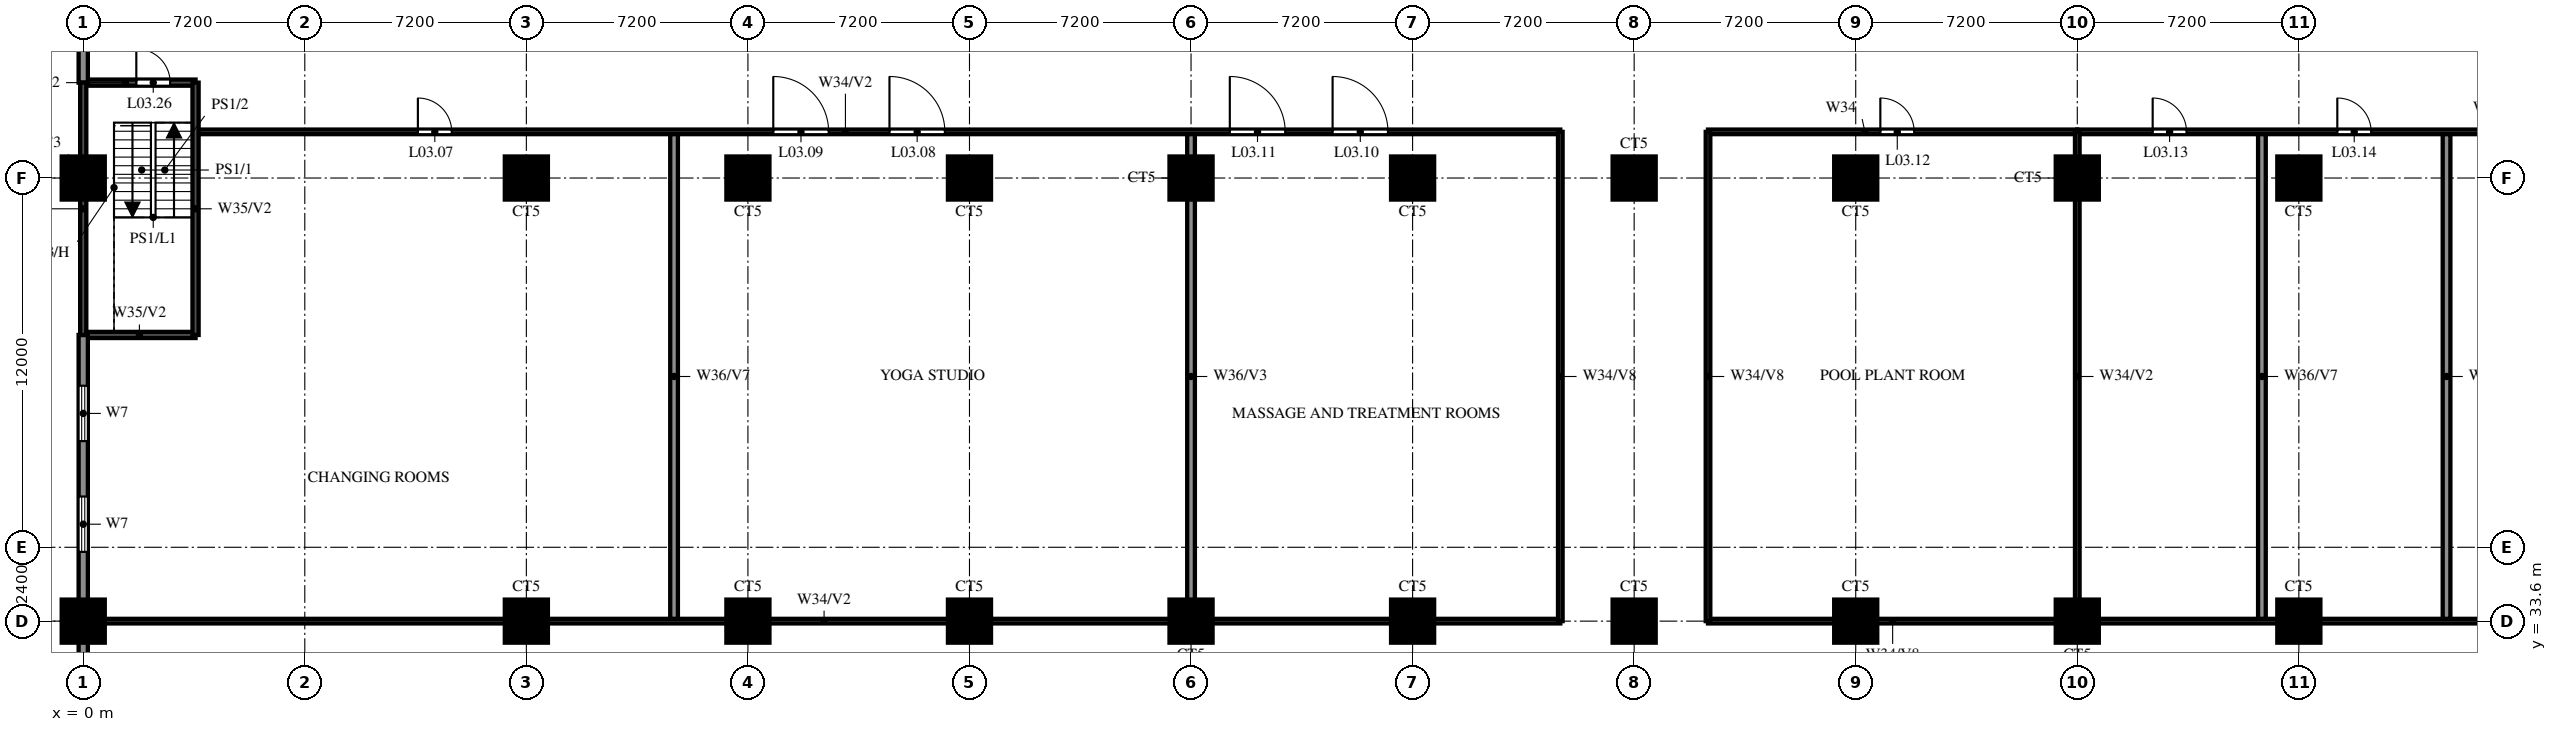
"""IFC4 building model, lengths in metres.
Left out: names, types, materials, properties, quantities, classifications, styles, units other than length and angle.
Written with IfcOpenShell. Run it as: python <this file> out.ifc"""

import sys

from ifc_helpers import new_model, si_unit, direction, frame, frame_2d, origin, origin_2d, place, context, subcontext, project, spatial, rectangle, circle, extrude, source, transform, mapped, element, fill, save


model = new_model("IFC4")
c1 = context("Model", 3, precision=1e-05, world=origin(), true_north=direction((0.0, 1.0)))
c2 = subcontext(c1, "Body", "Model", "MODEL_VIEW")
j1 = project(units=[si_unit("LENGTHUNIT", "METRE"), si_unit("PLANEANGLEUNIT", "RADIAN")], contexts=[c1])
p1 = place(None, origin())
s1 = spatial("IfcSite", under=j1, at=p1, CompositionType="ELEMENT")
p2 = place(p1, origin())
s2 = spatial("IfcBuilding", under=s1, at=p2, CompositionType="ELEMENT")
p3 = place(p2, frame((0.0, 0.0, 17.4)))
s3 = spatial("IfcBuildingStorey", under=s2, at=p3, CompositionType="ELEMENT", Elevation=17.4)
m1 = source(origin(), c2, "Body", "SweptSolid", [
    extrude(circle(Radius=0.7, at=origin_2d()), origin(), (0.0, 0.0, 1.0), 3.8),
])
for number, where, z_axis, x_axis in (
    (1, (0.0, 33.6, 0.0), (0.0, 0.0, 1.0), (1.0, 0.0, 0.0)),
    (2, (14.4, 33.6, 0.0), (0.0, 0.0, 1.0), (1.0, 0.0, 0.0)),
    (3, (21.6, 33.6, 0.0), (0.0, 0.0, 1.0), (1.0, 0.0, 0.0)),
    (4, (28.8, 33.6, 0.0), (0.0, 0.0, 1.0), (1.0, 0.0, 0.0)),
    (5, (36.0, 33.6, 0.0), (0.0, 0.0, 1.0), (1.0, 0.0, 0.0)),
    (6, (43.2, 33.6, 0.0), (0.0, 0.0, 1.0), (1.0, 0.0, 0.0)),
    (7, (50.4, 33.6, 0.0), (0.0, 0.0, 1.0), (1.0, 0.0, 0.0)),
    (8, (57.6, 33.6, 0.0), (0.0, 0.0, 1.0), (1.0, 0.0, 0.0)),
    (9, (64.8, 33.6, 0.0), (0.0, 0.0, 1.0), (1.0, 0.0, 0.0)),
    (10, (72.0, 33.6, 0.0), (0.0, 0.0, 1.0), (1.0, 0.0, 0.0)),
    (11, (0.0, 48.0, 0.0), (0.0, 0.0, 1.0), (1.0, 0.0, 0.0)),
    (12, (14.4, 48.0, 0.0), (0.0, 0.0, 1.0), (1.0, 0.0, 0.0)),
    (13, (21.6, 48.0, 0.0), (0.0, 0.0, 1.0), (1.0, 0.0, 0.0)),
    (14, (28.8, 48.0, 0.0), (0.0, 0.0, 1.0), (1.0, 0.0, 0.0)),
    (15, (36.0, 48.0, 0.0), (0.0, 0.0, 1.0), (1.0, 0.0, 0.0)),
    (16, (43.2, 48.0, 0.0), (0.0, 0.0, 1.0), (1.0, 0.0, 0.0)),
    (17, (50.4, 48.0, 0.0), (0.0, 0.0, 1.0), (1.0, 0.0, 0.0)),
    (18, (57.6, 48.0, 0.0), (0.0, 0.0, 1.0), (1.0, 0.0, 0.0)),
    (19, (64.8, 48.0, 0.0), (0.0, 0.0, 1.0), (1.0, 0.0, 0.0)),
    (20, (72.0, 48.0, 0.0), (0.0, 0.0, 1.0), (1.0, 0.0, 0.0)),
):
    element("IfcColumn", number, at=place(p3, frame(where, z_axis=z_axis, x_axis=x_axis)), inside=s3, PredefinedType="COLUMN", context=c2, shape_type="MappedRepresentation", body=[
        mapped(m1, transform((0.0, 0.0, 0.0))),
    ])
p4 = place(p3, frame((0.15, 33.6, 0.0), z_axis=(0.0, 0.0, 1.0), x_axis=(1.0, 0.0, 0.0)))
e21 = element("IfcWall", 21, at=p4, inside=s3, PredefinedType="PARTITIONING", context=c2, shape_type="SweptSolid", body=[
    extrude(rectangle(XDim=47.85, YDim=0.15, at=frame_2d((23.925, 0.0))), origin(), (0.0, 0.0, 1.0), 2.6),
])
p5 = place(p3, frame((64.8, 33.6, 0.0), z_axis=(0.0, 0.0, 1.0), x_axis=(1.0, 0.0, 0.0)))
e22 = element("IfcWall", 22, at=p5, inside=s3, PredefinedType="PARTITIONING", context=c2, shape_type="SweptSolid", body=[
    extrude(rectangle(XDim=35.85, YDim=0.15, at=frame_2d((17.925, 0.0))), origin(), (0.0, 0.0, 1.0), 2.6),
])
p6 = place(p3, frame((52.8, 33.6, 0.0), z_axis=(0.0, 0.0, 1.0), x_axis=(1.0, 0.0, 0.0)))
e23 = element("IfcWall", 23, at=p6, inside=s3, PredefinedType="PARTITIONING", context=c2, shape_type="SweptSolid", body=[
    extrude(rectangle(XDim=12.0, YDim=0.15, at=frame_2d((6.0, 0.0))), origin(), (0.0, 0.0, 1.0), 2.9),
])
p7 = place(p3, frame((0.0, 42.9, 0.0), z_axis=(0.0, 0.0, 1.0), x_axis=(1.0, 0.0, 0.0)))
e24 = element("IfcWall", 24, at=p7, inside=s3, PredefinedType="SOLIDWALL", context=c2, shape_type="SweptSolid", body=[
    extrude(rectangle(XDim=3.65, YDim=0.2, at=frame_2d((1.825, 0.0))), origin(), (0.0, 0.0, 1.0), 3.8),
])
p8 = place(p3, frame((3.75, 49.5, 0.0), z_axis=(0.0, 0.0, 1.0), x_axis=(1.0, 0.0, 0.0)))
e25 = element("IfcWall", 25, at=p8, inside=s3, PredefinedType="PARTITIONING", context=c2, shape_type="SweptSolid", body=[
    extrude(rectangle(XDim=44.25, YDim=0.15, at=frame_2d((22.125, 0.0))), origin(), (0.0, 0.0, 1.0), 2.6),
])
p9 = place(p8, frame((7.125, 0.0, 0.0)))
e26 = element("IfcOpeningElement", 26, at=p9, cuts=e25, PredefinedType="OPENING", context=c2, shape_type="SweptSolid", body=[
    extrude(rectangle(XDim=1.1, YDim=2.1, at=frame_2d((0.55, 1.05))), frame((0.0, 0.085, 0.0), z_axis=(0.0, -1.0, 0.0), x_axis=(1.0, 0.0, 0.0)), (0.0, 0.0, 1.0), 0.17),
])
p10 = place(p8, frame((22.45, 0.0, 0.0)))
e27 = element("IfcOpeningElement", 27, at=p10, cuts=e25, PredefinedType="OPENING", context=c2, shape_type="SweptSolid", body=[
    extrude(rectangle(XDim=1.8, YDim=2.1, at=frame_2d((0.9, 1.05))), frame((0.0, 0.085, 0.0), z_axis=(0.0, -1.0, 0.0), x_axis=(1.0, 0.0, 0.0)), (0.0, 0.0, 1.0), 0.17),
])
p11 = place(p8, frame((18.674, 0.0, 0.0)))
e28 = element("IfcOpeningElement", 28, at=p11, cuts=e25, PredefinedType="OPENING", context=c2, shape_type="SweptSolid", body=[
    extrude(rectangle(XDim=1.8, YDim=2.1, at=frame_2d((0.9, 1.05))), frame((0.0, 0.085, 0.0), z_axis=(0.0, -1.0, 0.0), x_axis=(1.0, 0.0, 0.0)), (0.0, 0.0, 1.0), 0.17),
])
p12 = place(p8, frame((36.85, 0.0, 0.0)))
e29 = element("IfcOpeningElement", 29, at=p12, cuts=e25, PredefinedType="OPENING", context=c2, shape_type="SweptSolid", body=[
    extrude(rectangle(XDim=1.8, YDim=2.1, at=frame_2d((0.9, 1.05))), frame((0.0, 0.085, 0.0), z_axis=(0.0, -1.0, 0.0), x_axis=(1.0, 0.0, 0.0)), (0.0, 0.0, 1.0), 0.17),
])
p13 = place(p8, frame((33.51, 0.0, 0.0)))
e30 = element("IfcOpeningElement", 30, at=p13, cuts=e25, PredefinedType="OPENING", context=c2, shape_type="SweptSolid", body=[
    extrude(rectangle(XDim=1.8, YDim=2.1, at=frame_2d((0.9, 1.05))), frame((0.0, 0.085, 0.0), z_axis=(0.0, -1.0, 0.0), x_axis=(1.0, 0.0, 0.0)), (0.0, 0.0, 1.0), 0.17),
])
p14 = place(p3, frame((64.8, 49.5, 0.0), z_axis=(0.0, 0.0, 1.0), x_axis=(1.0, 0.0, 0.0)))
e31 = element("IfcWall", 31, at=p14, inside=s3, PredefinedType="PARTITIONING", context=c2, shape_type="SweptSolid", body=[
    extrude(rectangle(XDim=32.25, YDim=0.15, at=frame_2d((16.125, 0.0))), origin(), (0.0, 0.0, 1.0), 2.6),
])
p15 = place(p14, frame((2.45, 0.0, 0.0)))
e32 = element("IfcOpeningElement", 32, at=p15, cuts=e31, PredefinedType="OPENING", context=c2, shape_type="SweptSolid", body=[
    extrude(rectangle(XDim=1.1, YDim=2.1, at=frame_2d((0.55, 1.05))), frame((0.0, 0.085, 0.0), z_axis=(0.0, -1.0, 0.0), x_axis=(1.0, 0.0, 0.0)), (0.0, 0.0, 1.0), 0.17),
])
p16 = place(p14, frame((8.45, 0.0, 0.0)))
e33 = element("IfcOpeningElement", 33, at=p16, cuts=e31, PredefinedType="OPENING", context=c2, shape_type="SweptSolid", body=[
    extrude(rectangle(XDim=1.1, YDim=2.1, at=frame_2d((0.55, 1.05))), frame((0.0, 0.085, 0.0), z_axis=(0.0, -1.0, 0.0), x_axis=(1.0, 0.0, 0.0)), (0.0, 0.0, 1.0), 0.17),
])
p17 = place(p14, frame((22.425, 0.0, 0.0)))
e34 = element("IfcOpeningElement", 34, at=p17, cuts=e31, PredefinedType="OPENING", context=c2, shape_type="SweptSolid", body=[
    extrude(rectangle(XDim=1.8, YDim=2.1, at=frame_2d((0.9, 1.05))), frame((0.0, 0.085, 0.0), z_axis=(0.0, -1.0, 0.0), x_axis=(1.0, 0.0, 0.0)), (0.0, 0.0, 1.0), 0.17),
])
p18 = place(p14, frame((15.213, 0.0, 0.0)))
e35 = element("IfcOpeningElement", 35, at=p18, cuts=e31, PredefinedType="OPENING", context=c2, shape_type="SweptSolid", body=[
    extrude(rectangle(XDim=1.8, YDim=2.1, at=frame_2d((0.9, 1.05))), frame((0.0, 0.085, 0.0), z_axis=(0.0, -1.0, 0.0), x_axis=(1.0, 0.0, 0.0)), (0.0, 0.0, 1.0), 0.17),
])
p19 = place(p3, frame((52.8, 49.5, 0.0), z_axis=(0.0, 0.0, 1.0), x_axis=(1.0, 0.0, 0.0)))
e36 = element("IfcWall", 36, at=p19, inside=s3, PredefinedType="PARTITIONING", context=c2, shape_type="SweptSolid", body=[
    extrude(rectangle(XDim=12.0, YDim=0.15, at=frame_2d((6.0, 0.0))), origin(), (0.0, 0.0, 1.0), 3.8),
])
p20 = place(p19, frame((5.6, 0.0, 0.0)))
e37 = element("IfcOpeningElement", 37, at=p20, cuts=e36, PredefinedType="OPENING", context=c2, shape_type="SweptSolid", body=[
    extrude(rectangle(XDim=1.1, YDim=2.1, at=frame_2d((0.55, 1.05))), frame((0.0, 0.085, 0.0), z_axis=(0.0, -1.0, 0.0), x_axis=(1.0, 0.0, 0.0)), (0.0, 0.0, 1.0), 0.17),
])
p21 = place(p3, frame((0.0, 51.1, 0.0), z_axis=(0.0, 0.0, 1.0), x_axis=(1.0, 0.0, 0.0)))
e38 = element("IfcWall", 38, at=p21, inside=s3, PredefinedType="SOLIDWALL", context=c2, shape_type="SweptSolid", body=[
    extrude(rectangle(XDim=3.65, YDim=0.2, at=frame_2d((1.825, 0.0))), origin(), (0.0, 0.0, 1.0), 3.8),
])
p22 = place(p21, frame((1.725, 0.0, 0.0)))
e39 = element("IfcOpeningElement", 39, at=p22, cuts=e38, PredefinedType="OPENING", context=c2, shape_type="SweptSolid", body=[
    extrude(rectangle(XDim=1.1, YDim=2.1, at=frame_2d((0.55, 1.05))), frame((0.0, 0.11, 0.0), z_axis=(0.0, -1.0, 0.0), x_axis=(1.0, 0.0, 0.0)), (0.0, 0.0, 1.0), 0.22),
])
p23 = place(p3, frame((0.0, 9.6, 0.0), z_axis=(0.0, 0.0, 1.0), x_axis=(0.0, 1.0, 0.0)))
e40 = element("IfcWall", 40, at=p23, inside=s3, PredefinedType="SOLIDWALL", context=c2, shape_type="SweptSolid", body=[
    extrude(rectangle(XDim=33.3, YDim=0.3, at=frame_2d((16.65, 0.0))), origin(), (0.0, 0.0, 1.0), 3.8),
])
p24 = place(p23, frame((1.05, 0.0, 0.6)))
e41 = element("IfcOpeningElement", 41, at=p24, cuts=e40, PredefinedType="OPENING", context=c2, shape_type="SweptSolid", body=[
    extrude(rectangle(XDim=1.8, YDim=2.4, at=frame_2d((0.9, 1.2))), frame((0.0, 0.16, 0.0), z_axis=(0.0, -1.0, 0.0), x_axis=(1.0, 0.0, 0.0)), (0.0, 0.0, 1.0), 0.32),
])
p25 = place(p23, frame((4.65, 0.0, 0.6)))
e42 = element("IfcOpeningElement", 42, at=p25, cuts=e40, PredefinedType="OPENING", context=c2, shape_type="SweptSolid", body=[
    extrude(rectangle(XDim=1.8, YDim=2.4, at=frame_2d((0.9, 1.2))), frame((0.0, 0.16, 0.0), z_axis=(0.0, -1.0, 0.0), x_axis=(1.0, 0.0, 0.0)), (0.0, 0.0, 1.0), 0.32),
])
p26 = place(p23, frame((11.85, 0.0, 0.6)))
e43 = element("IfcOpeningElement", 43, at=p26, cuts=e40, PredefinedType="OPENING", context=c2, shape_type="SweptSolid", body=[
    extrude(rectangle(XDim=1.8, YDim=2.4, at=frame_2d((0.9, 1.2))), frame((0.0, 0.16, 0.0), z_axis=(0.0, -1.0, 0.0), x_axis=(1.0, 0.0, 0.0)), (0.0, 0.0, 1.0), 0.32),
])
p27 = place(p23, frame((15.45, 0.0, 0.6)))
e44 = element("IfcOpeningElement", 44, at=p27, cuts=e40, PredefinedType="OPENING", context=c2, shape_type="SweptSolid", body=[
    extrude(rectangle(XDim=1.8, YDim=2.4, at=frame_2d((0.9, 1.2))), frame((0.0, 0.16, 0.0), z_axis=(0.0, -1.0, 0.0), x_axis=(1.0, 0.0, 0.0)), (0.0, 0.0, 1.0), 0.32),
])
p28 = place(p23, frame((26.25, 0.0, 0.6)))
e45 = element("IfcOpeningElement", 45, at=p28, cuts=e40, PredefinedType="OPENING", context=c2, shape_type="SweptSolid", body=[
    extrude(rectangle(XDim=1.8, YDim=2.4, at=frame_2d((0.9, 1.2))), frame((0.0, 0.16, 0.0), z_axis=(0.0, -1.0, 0.0), x_axis=(1.0, 0.0, 0.0)), (0.0, 0.0, 1.0), 0.32),
])
p29 = place(p23, frame((29.85, 0.0, 0.6)))
e46 = element("IfcOpeningElement", 46, at=p29, cuts=e40, PredefinedType="OPENING", context=c2, shape_type="SweptSolid", body=[
    extrude(rectangle(XDim=1.8, YDim=2.4, at=frame_2d((0.9, 1.2))), frame((0.0, 0.16, 0.0), z_axis=(0.0, -1.0, 0.0), x_axis=(1.0, 0.0, 0.0)), (0.0, 0.0, 1.0), 0.32),
])
p30 = place(p3, frame((0.0, 51.1, 0.0), z_axis=(0.0, 0.0, 1.0), x_axis=(0.0, 1.0, 0.0)))
e47 = element("IfcWall", 47, at=p30, inside=s3, PredefinedType="SOLIDWALL", context=c2, shape_type="SweptSolid", body=[
    extrude(rectangle(XDim=3.2, YDim=0.3, at=frame_2d((1.6, 0.0))), origin(), (0.0, 0.0, 1.0), 3.8),
])
for number, where, z_axis, x_axis in (
    (48, (0.0, 42.9, 0.0), (0.0, 0.0, 1.0), (0.0, 1.0, 0.0)),
    (49, (3.65, 42.9, 0.0), (0.0, 0.0, 1.0), (0.0, 1.0, 0.0)),
):
    element("IfcWall", number, at=place(p3, frame(where, z_axis=z_axis, x_axis=x_axis)), inside=s3, PredefinedType="SOLIDWALL", context=c2, shape_type="SweptSolid", body=[
        extrude(rectangle(XDim=8.2, YDim=0.2, at=frame_2d((4.1, 0.0))), origin(), (0.0, 0.0, 1.0), 3.8),
    ])
p31 = place(p3, frame((19.2, 33.675, 0.0), z_axis=(0.0, 0.0, 1.0), x_axis=(0.0, 1.0, 0.0)))
e50 = element("IfcWall", 50, at=p31, inside=s3, PredefinedType="SOLIDWALL", context=c2, shape_type="SweptSolid", body=[
    extrude(rectangle(XDim=15.75, YDim=0.25, at=frame_2d((7.875, 0.0))), origin(), (0.0, 0.0, 1.0), 2.9),
])
p32 = place(p3, frame((36.0, 33.675, 0.0), z_axis=(0.0, 0.0, 1.0), x_axis=(0.0, 1.0, 0.0)))
e51 = element("IfcWall", 51, at=p32, inside=s3, PredefinedType="SOLIDWALL", context=c2, shape_type="SweptSolid", body=[
    extrude(rectangle(XDim=15.75, YDim=0.25, at=frame_2d((7.875, 0.0))), origin(), (0.0, 0.0, 1.0), 2.6),
])
for number, where, z_axis, x_axis in (
    (52, (48.0, 33.6, 0.0), (0.0, 0.0, 1.0), (0.0, 1.0, 0.0)),
    (53, (52.8, 33.6, 0.0), (0.0, 0.0, 1.0), (0.0, 1.0, 0.0)),
):
    element("IfcWall", number, at=place(p3, frame(where, z_axis=z_axis, x_axis=x_axis)), inside=s3, PredefinedType="PARTITIONING", context=c2, shape_type="SweptSolid", body=[
        extrude(rectangle(XDim=15.9, YDim=0.15, at=frame_2d((7.95, 0.0))), origin(), (0.0, 0.0, 1.0), 2.9),
    ])
p33 = place(p3, frame((64.8, 33.6, 0.0), z_axis=(0.0, 0.0, 1.0), x_axis=(0.0, 1.0, 0.0)))
e54 = element("IfcWall", 54, at=p33, inside=s3, PredefinedType="PARTITIONING", context=c2, shape_type="SweptSolid", body=[
    extrude(rectangle(XDim=15.9, YDim=0.15, at=frame_2d((7.95, 0.0))), origin(), (0.0, 0.0, 1.0), 2.6),
])
for number, where, z_axis, x_axis in (
    (55, (70.8, 33.675, 0.0), (0.0, 0.0, 1.0), (0.0, 1.0, 0.0)),
    (56, (76.8, 33.675, 0.0), (0.0, 0.0, 1.0), (0.0, 1.0, 0.0)),
):
    element("IfcWall", number, at=place(p3, frame(where, z_axis=z_axis, x_axis=x_axis)), inside=s3, PredefinedType="SOLIDWALL", context=c2, shape_type="SweptSolid", body=[
        extrude(rectangle(XDim=15.75, YDim=0.25, at=frame_2d((7.875, 0.0))), origin(), (0.0, 0.0, 1.0), 2.9),
    ])
p34 = place(p9, origin())
e57 = element("IfcDoor", 57, at=p34, inside=s3, OperationType="SINGLE_SWING_LEFT", PredefinedType="DOOR", context=c2, shape_type="SweptSolid", body=[
    extrude(rectangle(XDim=1.1, YDim=2.1, at=frame_2d((0.55, 1.05))), frame((0.0, 0.025, 0.0), z_axis=(0.0, -1.0, 0.0), x_axis=(1.0, 0.0, 0.0)), (0.0, 0.0, 1.0), 0.05),
])
fill(e26, e57)
p35 = place(p10, origin())
e58 = element("IfcDoor", 58, at=p35, inside=s3, OperationType="DOUBLE_DOOR_SINGLE_SWING", PredefinedType="DOOR", context=c2, shape_type="SweptSolid", body=[
    extrude(rectangle(XDim=1.8, YDim=2.1, at=frame_2d((0.9, 1.05))), frame((0.0, 0.025, 0.0), z_axis=(0.0, -1.0, 0.0), x_axis=(1.0, 0.0, 0.0)), (0.0, 0.0, 1.0), 0.05),
])
fill(e27, e58)
p36 = place(p11, origin())
e59 = element("IfcDoor", 59, at=p36, inside=s3, OperationType="DOUBLE_DOOR_SINGLE_SWING", PredefinedType="DOOR", context=c2, shape_type="SweptSolid", body=[
    extrude(rectangle(XDim=1.8, YDim=2.1, at=frame_2d((0.9, 1.05))), frame((0.0, 0.025, 0.0), z_axis=(0.0, -1.0, 0.0), x_axis=(1.0, 0.0, 0.0)), (0.0, 0.0, 1.0), 0.05),
])
fill(e28, e59)
p37 = place(p12, origin())
e60 = element("IfcDoor", 60, at=p37, inside=s3, OperationType="DOUBLE_DOOR_SINGLE_SWING", PredefinedType="DOOR", context=c2, shape_type="SweptSolid", body=[
    extrude(rectangle(XDim=1.8, YDim=2.1, at=frame_2d((0.9, 1.05))), frame((0.0, 0.025, 0.0), z_axis=(0.0, -1.0, 0.0), x_axis=(1.0, 0.0, 0.0)), (0.0, 0.0, 1.0), 0.05),
])
fill(e29, e60)
p38 = place(p13, origin())
e61 = element("IfcDoor", 61, at=p38, inside=s3, OperationType="DOUBLE_DOOR_SINGLE_SWING", PredefinedType="DOOR", context=c2, shape_type="SweptSolid", body=[
    extrude(rectangle(XDim=1.8, YDim=2.1, at=frame_2d((0.9, 1.05))), frame((0.0, 0.025, 0.0), z_axis=(0.0, -1.0, 0.0), x_axis=(1.0, 0.0, 0.0)), (0.0, 0.0, 1.0), 0.05),
])
fill(e30, e61)
p39 = place(p20, origin())
e62 = element("IfcDoor", 62, at=p39, inside=s3, OperationType="SINGLE_SWING_RIGHT", PredefinedType="DOOR", context=c2, shape_type="SweptSolid", body=[
    extrude(rectangle(XDim=1.1, YDim=2.1, at=frame_2d((0.55, 1.05))), frame((0.0, 0.025, 0.0), z_axis=(0.0, -1.0, 0.0), x_axis=(1.0, 0.0, 0.0)), (0.0, 0.0, 1.0), 0.05),
])
fill(e37, e62)
p40 = place(p15, origin())
e63 = element("IfcDoor", 63, at=p40, inside=s3, OperationType="SINGLE_SWING_LEFT", PredefinedType="DOOR", context=c2, shape_type="SweptSolid", body=[
    extrude(rectangle(XDim=1.1, YDim=2.1, at=frame_2d((0.55, 1.05))), frame((0.0, 0.025, 0.0), z_axis=(0.0, -1.0, 0.0), x_axis=(1.0, 0.0, 0.0)), (0.0, 0.0, 1.0), 0.05),
])
fill(e32, e63)
p41 = place(p16, origin())
e64 = element("IfcDoor", 64, at=p41, inside=s3, OperationType="SINGLE_SWING_LEFT", PredefinedType="DOOR", context=c2, shape_type="SweptSolid", body=[
    extrude(rectangle(XDim=1.1, YDim=2.1, at=frame_2d((0.55, 1.05))), frame((0.0, 0.025, 0.0), z_axis=(0.0, -1.0, 0.0), x_axis=(1.0, 0.0, 0.0)), (0.0, 0.0, 1.0), 0.05),
])
fill(e33, e64)
p42 = place(p22, origin())
e65 = element("IfcDoor", 65, at=p42, inside=s3, OperationType="SINGLE_SWING_RIGHT", PredefinedType="DOOR", context=c2, shape_type="SweptSolid", body=[
    extrude(rectangle(XDim=1.1, YDim=2.1, at=frame_2d((0.55, 1.05))), frame((0.0, 0.025, 0.0), z_axis=(0.0, -1.0, 0.0), x_axis=(1.0, 0.0, 0.0)), (0.0, 0.0, 1.0), 0.05),
])
fill(e39, e65)
p43 = place(p28, origin())
e66 = element("IfcWindow", 66, at=p43, inside=s3, PartitioningType="DOUBLE_PANEL_VERTICAL", PredefinedType="WINDOW", context=c2, shape_type="SweptSolid", body=[
    extrude(rectangle(XDim=1.8, YDim=2.4, at=frame_2d((0.9, 1.2))), frame((0.0, 0.03, 0.0), z_axis=(0.0, -1.0, 0.0), x_axis=(1.0, 0.0, 0.0)), (0.0, 0.0, 1.0), 0.06),
])
fill(e45, e66)
p44 = place(p29, origin())
e67 = element("IfcWindow", 67, at=p44, inside=s3, PartitioningType="DOUBLE_PANEL_VERTICAL", PredefinedType="WINDOW", context=c2, shape_type="SweptSolid", body=[
    extrude(rectangle(XDim=1.8, YDim=2.4, at=frame_2d((0.9, 1.2))), frame((0.0, 0.03, 0.0), z_axis=(0.0, -1.0, 0.0), x_axis=(1.0, 0.0, 0.0)), (0.0, 0.0, 1.0), 0.06),
])
fill(e46, e67)
save(model, sys.argv[1])
